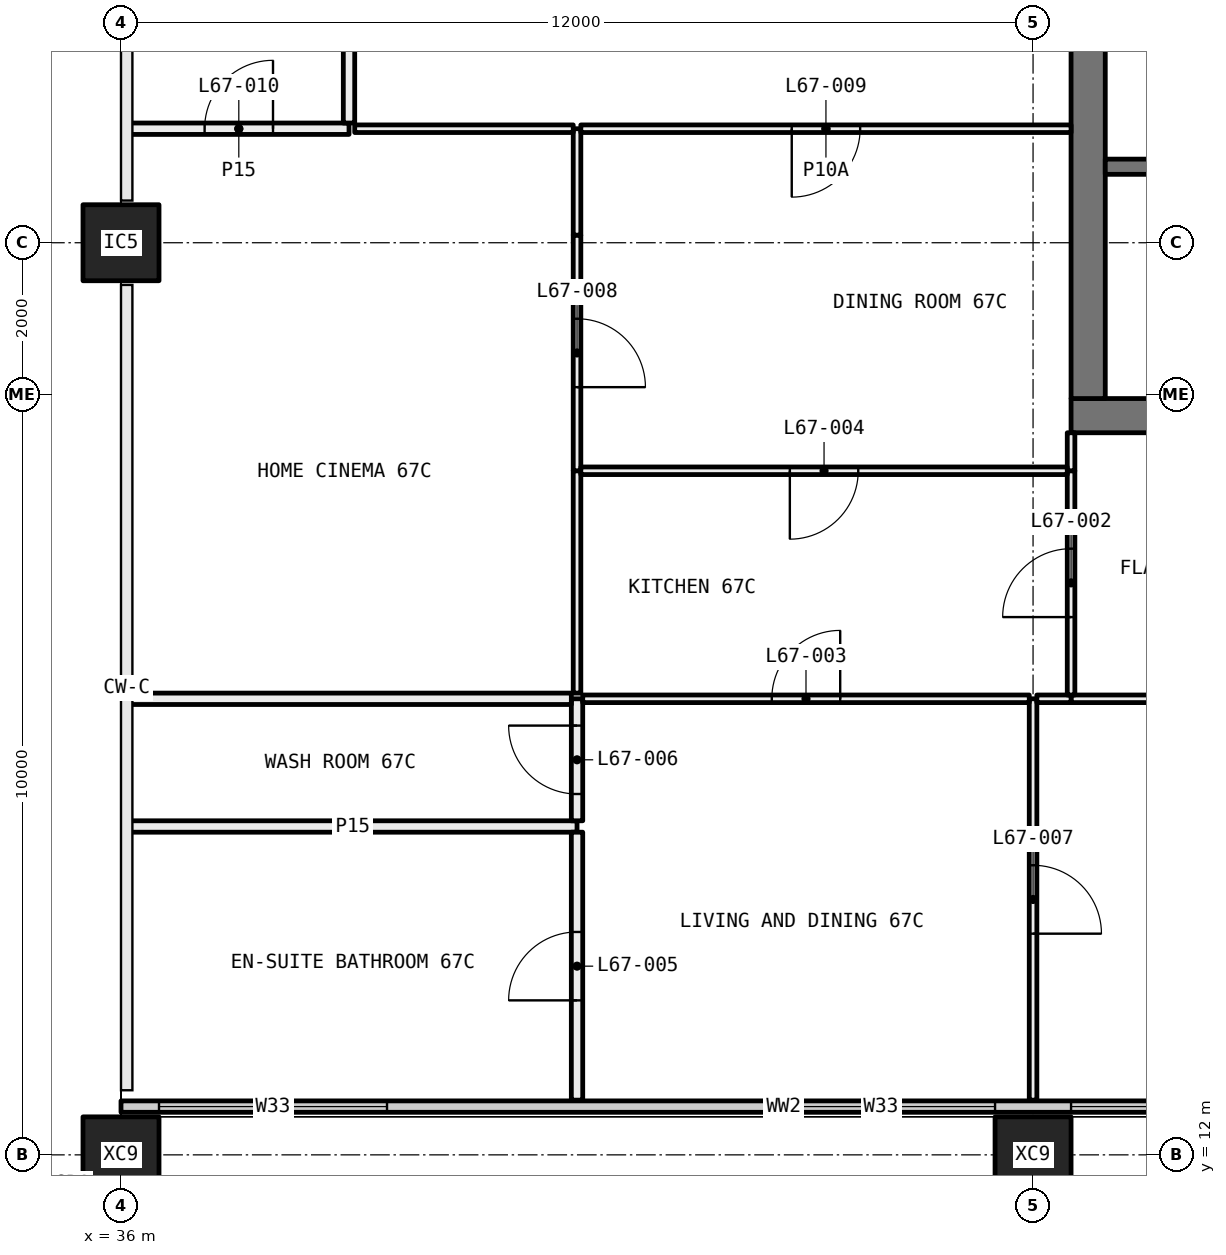
"""IFC4 building model, lengths in metres.
Left out: names, types, materials, properties, quantities, classifications, styles, units other than length and angle.
Written with IfcOpenShell. Run it as: python <this file> out.ifc"""

import sys

from ifc_helpers import new_model, si_unit, direction, frame, frame_2d, origin, origin_2d, place, context, subcontext, project, spatial, rectangle, hollow_rectangle, extrude, element, fill, save


model = new_model("IFC4")
c1 = context("Model", 3, precision=1e-05, world=origin(), true_north=direction((0.0, 1.0)))
c2 = subcontext(c1, "Body", "Model", "MODEL_VIEW")
j1 = project(units=[si_unit("LENGTHUNIT", "METRE"), si_unit("PLANEANGLEUNIT", "RADIAN")], contexts=[c1])
p1 = place(None, origin())
s1 = spatial("IfcSite", under=j1, at=p1, CompositionType="ELEMENT")
p2 = place(p1, origin())
s2 = spatial("IfcBuilding", under=s1, at=p2, CompositionType="ELEMENT")
p3 = place(p2, frame((0.0, 0.0, 249.0)))
s3 = spatial("IfcBuildingStorey", under=s2, at=p3, CompositionType="ELEMENT", Elevation=249.0)
p4 = place(p3, frame((36.0, 12.0, -0.4), z_axis=(0.0, 0.0, 1.0), x_axis=(1.0, 0.0, 0.0)))
e1 = element("IfcColumn", 1, at=p4, inside=s3, PredefinedType="COLUMN", context=c2, shape_type="SweptSolid", body=[
    extrude(hollow_rectangle(XDim=1.0, YDim=1.0, WallThickness=0.036, at=origin_2d()), origin(), (0.0, 0.0, 1.0), 3.45),
])
p5 = place(p3, frame((36.0, 24.0, 0.0), z_axis=(0.0, 0.0, 1.0), x_axis=(1.0, 0.0, 0.0)))
e2 = element("IfcColumn", 2, at=p5, inside=s3, PredefinedType="COLUMN", context=c2, shape_type="SweptSolid", body=[
    extrude(hollow_rectangle(XDim=1.0, YDim=1.0, WallThickness=0.04, at=origin_2d()), origin(), (0.0, 0.0, 1.0), 3.05),
])
p6 = place(p3, frame((48.0, 12.0, -0.4), z_axis=(0.0, 0.0, 1.0), x_axis=(1.0, 0.0, 0.0)))
e3 = element("IfcColumn", 3, at=p6, inside=s3, PredefinedType="COLUMN", context=c2, shape_type="SweptSolid", body=[
    extrude(hollow_rectangle(XDim=1.0, YDim=1.0, WallThickness=0.036, at=origin_2d()), origin(), (0.0, 0.0, 1.0), 3.45),
])
p7 = place(p3, frame((36.0, 12.635, 0.0), z_axis=(0.0, 0.0, 1.0), x_axis=(1.0, 0.0, 0.0)))
e4 = element("IfcWall", 4, at=p7, inside=s3, PredefinedType="ELEMENTEDWALL", context=c2, shape_type="SweptSolid", body=[
    extrude(rectangle(XDim=17.44, YDim=0.15, at=frame_2d((8.72, 0.0))), origin(), (0.0, 0.0, 1.0), 3.05),
])
p8 = place(p7, frame((0.5, 0.0, 0.45)))
e5 = element("IfcOpeningElement", 5, at=p8, cuts=e4, PredefinedType="OPENING", context=c2, shape_type="SweptSolid", body=[
    extrude(rectangle(XDim=3.0, YDim=2.55, at=frame_2d((1.5, 1.275))), frame((0.0, 0.085, 0.0), z_axis=(0.0, -1.0, 0.0), x_axis=(1.0, 0.0, 0.0)), (0.0, 0.0, 1.0), 0.17),
])
p9 = place(p7, frame((8.5, 0.0, 0.45)))
e6 = element("IfcOpeningElement", 6, at=p9, cuts=e4, PredefinedType="OPENING", context=c2, shape_type="SweptSolid", body=[
    extrude(rectangle(XDim=3.0, YDim=2.55, at=frame_2d((1.5, 1.275))), frame((0.0, 0.085, 0.0), z_axis=(0.0, -1.0, 0.0), x_axis=(1.0, 0.0, 0.0)), (0.0, 0.0, 1.0), 0.17),
])
p10 = place(p7, frame((12.5, 0.0, 0.45)))
e7 = element("IfcOpeningElement", 7, at=p10, cuts=e4, PredefinedType="OPENING", context=c2, shape_type="SweptSolid", body=[
    extrude(rectangle(XDim=4.5, YDim=2.55, at=frame_2d((2.25, 1.275))), frame((0.0, 0.085, 0.0), z_axis=(0.0, -1.0, 0.0), x_axis=(1.0, 0.0, 0.0)), (0.0, 0.0, 1.0), 0.17),
])
p11 = place(p3, frame((42.0, 16.32, 0.0), z_axis=(0.0, 0.0, 1.0), x_axis=(-1.0, 0.0, 0.0)))
e8 = element("IfcWall", 8, at=p11, inside=s3, PredefinedType="PARTITIONING", context=c2, shape_type="SweptSolid", body=[
    extrude(rectangle(XDim=5.9, YDim=0.15, at=frame_2d((2.95, 0.0))), origin(), (0.0, 0.0, 1.0), 3.05),
])
p12 = place(p3, frame((42.0, 12.72, 0.0), z_axis=(0.0, 0.0, 1.0), x_axis=(0.0, 1.0, 0.0)))
e9 = element("IfcWall", 9, at=p12, inside=s3, PredefinedType="PARTITIONING", context=c2, shape_type="SweptSolid", body=[
    extrude(rectangle(XDim=3.525, YDim=0.15, at=frame_2d((1.763, 0.0))), origin(), (0.0, 0.0, 1.0), 3.05),
])
p13 = place(p12, frame((1.312, 0.0, 0.0)))
e10 = element("IfcOpeningElement", 10, at=p13, cuts=e9, PredefinedType="OPENING", context=c2, shape_type="SweptSolid", body=[
    extrude(rectangle(XDim=0.9, YDim=2.1, at=frame_2d((0.45, 1.05))), frame((0.0, 0.085, 0.0), z_axis=(0.0, -1.0, 0.0), x_axis=(1.0, 0.0, 0.0)), (0.0, 0.0, 1.0), 0.17),
])
p14 = place(p3, frame((42.0, 16.395, 0.0), z_axis=(0.0, 0.0, 1.0), x_axis=(0.0, 1.0, 0.0)))
e11 = element("IfcWall", 11, at=p14, inside=s3, PredefinedType="PARTITIONING", context=c2, shape_type="SweptSolid", body=[
    extrude(rectangle(XDim=1.605, YDim=0.15, at=frame_2d((0.802, 0.0))), origin(), (0.0, 0.0, 1.0), 3.05),
])
p15 = place(p14, frame((0.353, 0.0, 0.0)))
e12 = element("IfcOpeningElement", 12, at=p15, cuts=e11, PredefinedType="OPENING", context=c2, shape_type="SweptSolid", body=[
    extrude(rectangle(XDim=0.9, YDim=2.1, at=frame_2d((0.45, 1.05))), frame((0.0, 0.085, 0.0), z_axis=(0.0, -1.0, 0.0), x_axis=(1.0, 0.0, 0.0)), (0.0, 0.0, 1.0), 0.17),
])
p16 = place(p3, frame((41.925, 18.0, 0.0), z_axis=(0.0, 0.0, 1.0), x_axis=(-1.0, 0.0, 0.0)))
e13 = element("IfcWall", 13, at=p16, inside=s3, PredefinedType="PARTITIONING", context=c2, shape_type="SweptSolid", body=[
    extrude(rectangle(XDim=5.825, YDim=0.15, at=frame_2d((2.913, 0.0))), origin(), (0.0, 0.0, 1.0), 3.05),
])
p17 = place(p3, frame((48.0, 12.72, 0.0), z_axis=(0.0, 0.0, 1.0), x_axis=(0.0, 1.0, 0.0)))
e14 = element("IfcWall", 14, at=p17, inside=s3, PredefinedType="PARTITIONING", context=c2, shape_type="SweptSolid", body=[
    extrude(rectangle(XDim=5.28, YDim=0.1, at=frame_2d((2.64, 0.0))), origin(), (0.0, 0.0, 1.0), 3.05),
])
p18 = place(p17, frame((2.19, 0.0, 0.0)))
e15 = element("IfcOpeningElement", 15, at=p18, cuts=e14, PredefinedType="OPENING", context=c2, shape_type="SweptSolid", body=[
    extrude(rectangle(XDim=0.9, YDim=2.1, at=frame_2d((0.45, 1.05))), frame((0.0, 0.06, 0.0), z_axis=(0.0, -1.0, 0.0), x_axis=(1.0, 0.0, 0.0)), (0.0, 0.0, 1.0), 0.12),
])
p19 = place(p3, frame((47.95, 18.0, 0.0), z_axis=(0.0, 0.0, 1.0), x_axis=(-1.0, 0.0, 0.0)))
e16 = element("IfcWall", 16, at=p19, inside=s3, PredefinedType="PARTITIONING", context=c2, shape_type="SweptSolid", body=[
    extrude(rectangle(XDim=5.875, YDim=0.1, at=frame_2d((2.938, 0.0))), origin(), (0.0, 0.0, 1.0), 3.05),
])
p20 = place(p19, frame((2.488, 0.0, 0.0)))
e17 = element("IfcOpeningElement", 17, at=p20, cuts=e16, PredefinedType="OPENING", context=c2, shape_type="SweptSolid", body=[
    extrude(rectangle(XDim=0.9, YDim=2.1, at=frame_2d((0.45, 1.05))), frame((0.0, 0.06, 0.0), z_axis=(0.0, -1.0, 0.0), x_axis=(1.0, 0.0, 0.0)), (0.0, 0.0, 1.0), 0.12),
])
p21 = place(p3, frame((53.28, 18.0, 0.0), z_axis=(0.0, 0.0, 1.0), x_axis=(-1.0, 0.0, 0.0)))
e18 = element("IfcWall", 18, at=p21, inside=s3, PredefinedType="PARTITIONING", context=c2, shape_type="SweptSolid", body=[
    extrude(rectangle(XDim=4.78, YDim=0.1, at=frame_2d((2.39, 0.0))), origin(), (0.0, 0.0, 1.0), 3.05),
])
p22 = place(p3, frame((48.5, 18.0, 0.0), z_axis=(0.0, 0.0, 1.0), x_axis=(-1.0, 0.0, 0.0)))
e19 = element("IfcWall", 19, at=p22, inside=s3, PredefinedType="PARTITIONING", context=c2, shape_type="SweptSolid", body=[
    extrude(rectangle(XDim=0.45, YDim=0.1, at=frame_2d((0.225, 0.0))), origin(), (0.0, 0.0, 1.0), 3.05),
])
p23 = place(p3, frame((48.5, 21.0, 0.0), z_axis=(0.0, 0.0, 1.0), x_axis=(0.0, -1.0, 0.0)))
e20 = element("IfcWall", 20, at=p23, inside=s3, PredefinedType="PARTITIONING", context=c2, shape_type="SweptSolid", body=[
    extrude(rectangle(XDim=2.95, YDim=0.1, at=frame_2d((1.475, 0.0))), origin(), (0.0, 0.0, 1.0), 3.05),
])
p24 = place(p23, frame((1.025, 0.0, 0.0)))
e21 = element("IfcOpeningElement", 21, at=p24, cuts=e20, PredefinedType="OPENING", context=c2, shape_type="SweptSolid", body=[
    extrude(rectangle(XDim=0.9, YDim=2.1, at=frame_2d((0.45, 1.05))), frame((0.0, 0.06, 0.0), z_axis=(0.0, -1.0, 0.0), x_axis=(1.0, 0.0, 0.0)), (0.0, 0.0, 1.0), 0.12),
])
p25 = place(p3, frame((48.5, 21.5, 0.0), z_axis=(0.0, 0.0, 1.0), x_axis=(0.0, -1.0, 0.0)))
e22 = element("IfcWall", 22, at=p25, inside=s3, PredefinedType="PARTITIONING", context=c2, shape_type="SweptSolid", body=[
    extrude(rectangle(XDim=0.5, YDim=0.1, at=frame_2d((0.25, 0.0))), origin(), (0.0, 0.0, 1.0), 3.05),
])
p26 = place(p3, frame((42.0, 18.075, 0.0), z_axis=(0.0, 0.0, 1.0), x_axis=(0.0, 1.0, 0.0)))
e23 = element("IfcWall", 23, at=p26, inside=s3, PredefinedType="PARTITIONING", context=c2, shape_type="SweptSolid", body=[
    extrude(rectangle(XDim=2.925, YDim=0.1, at=frame_2d((1.462, 0.0))), origin(), (0.0, 0.0, 1.0), 3.05),
])
p27 = place(p3, frame((42.0, 21.0, 0.0), z_axis=(0.0, 0.0, 1.0), x_axis=(0.0, 1.0, 0.0)))
e24 = element("IfcWall", 24, at=p27, inside=s3, PredefinedType="PARTITIONING", context=c2, shape_type="SweptSolid", body=[
    extrude(rectangle(XDim=3.1, YDim=0.1, at=frame_2d((1.55, 0.0))), origin(), (0.0, 0.0, 1.0), 2.45),
])
p28 = place(p27, frame((1.1, 0.0, 0.0)))
e25 = element("IfcOpeningElement", 25, at=p28, cuts=e24, PredefinedType="OPENING", context=c2, shape_type="SweptSolid", body=[
    extrude(rectangle(XDim=0.9, YDim=2.1, at=frame_2d((0.45, 1.05))), frame((0.0, 0.06, 0.0), z_axis=(0.0, -1.0, 0.0), x_axis=(1.0, 0.0, 0.0)), (0.0, 0.0, 1.0), 0.12),
])
p29 = place(p3, frame((42.0, 24.1, 0.0), z_axis=(0.0, 0.0, 1.0), x_axis=(0.0, 1.0, 0.0)))
e26 = element("IfcWall", 26, at=p29, inside=s3, PredefinedType="PARTITIONING", context=c2, shape_type="SweptSolid", body=[
    extrude(rectangle(XDim=1.4, YDim=0.1, at=frame_2d((0.7, 0.0))), origin(), (0.0, 0.0, 1.0), 3.05),
])
p30 = place(p3, frame((39.0, 25.5, 0.0), z_axis=(0.0, 0.0, 1.0), x_axis=(-1.0, 0.0, 0.0)))
e27 = element("IfcWall", 27, at=p30, inside=s3, PredefinedType="PARTITIONING", context=c2, shape_type="SweptSolid", body=[
    extrude(rectangle(XDim=2.9, YDim=0.15, at=frame_2d((1.45, 0.0))), origin(), (0.0, 0.0, 1.0), 3.05),
])
p31 = place(p30, frame((1.0, 0.0, 0.0)))
e28 = element("IfcOpeningElement", 28, at=p31, cuts=e27, PredefinedType="OPENING", context=c2, shape_type="SweptSolid", body=[
    extrude(rectangle(XDim=0.9, YDim=2.1, at=frame_2d((0.45, 1.05))), frame((0.0, 0.085, 0.0), z_axis=(0.0, -1.0, 0.0), x_axis=(1.0, 0.0, 0.0)), (0.0, 0.0, 1.0), 0.17),
])
p32 = place(p3, frame((41.95, 25.5, 0.0), z_axis=(0.0, 0.0, 1.0), x_axis=(-1.0, 0.0, 0.0)))
e29 = element("IfcWall", 29, at=p32, inside=s3, PredefinedType="PARTITIONING", context=c2, shape_type="SweptSolid", body=[
    extrude(rectangle(XDim=2.875, YDim=0.1, at=frame_2d((1.438, 0.0))), origin(), (0.0, 0.0, 1.0), 3.05),
])
p33 = place(p3, frame((48.45, 21.0, 0.0), z_axis=(0.0, 0.0, 1.0), x_axis=(-1.0, 0.0, 0.0)))
e30 = element("IfcWall", 30, at=p33, inside=s3, PredefinedType="PARTITIONING", context=c2, shape_type="SweptSolid", body=[
    extrude(rectangle(XDim=6.4, YDim=0.1, at=frame_2d((3.2, 0.0))), origin(), (0.0, 0.0, 1.0), 3.05),
])
p34 = place(p33, frame((2.75, 0.0, 0.0)))
e31 = element("IfcOpeningElement", 31, at=p34, cuts=e30, PredefinedType="OPENING", context=c2, shape_type="SweptSolid", body=[
    extrude(rectangle(XDim=0.9, YDim=2.1, at=frame_2d((0.45, 1.05))), frame((0.0, 0.06, 0.0), z_axis=(0.0, -1.0, 0.0), x_axis=(1.0, 0.0, 0.0)), (0.0, 0.0, 1.0), 0.12),
])
p35 = place(p3, frame((48.5, 25.5, 0.0), z_axis=(0.0, 0.0, 1.0), x_axis=(-1.0, 0.0, 0.0)))
e32 = element("IfcWall", 32, at=p35, inside=s3, PredefinedType="PARTITIONING", context=c2, shape_type="SweptSolid", body=[
    extrude(rectangle(XDim=6.45, YDim=0.1, at=frame_2d((3.225, 0.0))), origin(), (0.0, 0.0, 1.0), 3.05),
])
p36 = place(p35, frame((2.775, 0.0, 0.0)))
e33 = element("IfcOpeningElement", 33, at=p36, cuts=e32, PredefinedType="OPENING", context=c2, shape_type="SweptSolid", body=[
    extrude(rectangle(XDim=0.9, YDim=2.1, at=frame_2d((0.45, 1.05))), frame((0.0, 0.06, 0.0), z_axis=(0.0, -1.0, 0.0), x_axis=(1.0, 0.0, 0.0)), (0.0, 0.0, 1.0), 0.12),
])
p37 = place(p3, frame((39.0, 25.575, 0.0), z_axis=(0.0, 0.0, 1.0), x_axis=(0.0, 1.0, 0.0)))
e34 = element("IfcWall", 34, at=p37, inside=s3, PredefinedType="PARTITIONING", context=c2, shape_type="SweptSolid", body=[
    extrude(rectangle(XDim=1.712, YDim=0.15, at=frame_2d((0.856, 0.0))), origin(), (0.0, 0.0, 1.0), 3.05),
])
p38 = place(p3, frame((59.5, 21.725, 0.0), z_axis=(0.0, 0.0, 1.0), x_axis=(-1.0, 0.0, 0.0)))
e35 = element("IfcWall", 35, at=p38, inside=s3, PredefinedType="SHEAR", context=c2, shape_type="SweptSolid", body=[
    extrude(rectangle(XDim=11.0, YDim=0.45, at=frame_2d((5.5, 0.0))), origin(), (0.0, 0.0, 1.0), 3.05),
])
p39 = place(p38, frame((1.125, 0.0, 0.0)))
e36 = element("IfcOpeningElement", 36, at=p39, cuts=e35, PredefinedType="OPENING", context=c2, shape_type="SweptSolid", body=[
    extrude(rectangle(XDim=1.0, YDim=2.1, at=frame_2d((0.5, 1.05))), frame((0.0, 0.235, 0.0), z_axis=(0.0, -1.0, 0.0), x_axis=(1.0, 0.0, 0.0)), (0.0, 0.0, 1.0), 0.47),
])
p40 = place(p3, frame((48.725, 21.95, 0.0), z_axis=(0.0, 0.0, 1.0), x_axis=(0.0, 1.0, 0.0)))
e37 = element("IfcWall", 37, at=p40, inside=s3, PredefinedType="SHEAR", context=c2, shape_type="SweptSolid", body=[
    extrude(rectangle(XDim=16.1, YDim=0.45, at=frame_2d((8.05, 0.0))), origin(), (0.0, 0.0, 1.0), 3.05),
])
p41 = place(p40, frame((7.25, 0.0, 0.0)))
e38 = element("IfcOpeningElement", 38, at=p41, cuts=e37, PredefinedType="OPENING", context=c2, shape_type="SweptSolid", body=[
    extrude(rectangle(XDim=1.6, YDim=2.1, at=frame_2d((0.8, 1.05))), frame((0.0, 0.235, 0.0), z_axis=(0.0, -1.0, 0.0), x_axis=(1.0, 0.0, 0.0)), (0.0, 0.0, 1.0), 0.47),
])
p42 = place(p3, frame((56.5, 25.0, 0.0), z_axis=(0.0, 0.0, 1.0), x_axis=(-1.0, 0.0, 0.0)))
e39 = element("IfcWall", 39, at=p42, inside=s3, PredefinedType="SOLIDWALL", context=c2, shape_type="SweptSolid", body=[
    extrude(rectangle(XDim=7.55, YDim=0.2, at=frame_2d((3.775, 0.0))), origin(), (0.0, 0.0, 1.0), 3.05),
])
p43 = place(p8, origin())
e40 = element("IfcWindow", 40, at=p43, inside=s3, PartitioningType="SINGLE_PANEL", PredefinedType="WINDOW", context=c2, shape_type="SweptSolid", body=[
    extrude(rectangle(XDim=3.0, YDim=2.55, at=frame_2d((1.5, 1.275))), frame((0.0, 0.03, 0.0), z_axis=(0.0, -1.0, 0.0), x_axis=(1.0, 0.0, 0.0)), (0.0, 0.0, 1.0), 0.06),
])
fill(e5, e40)
p44 = place(p9, origin())
e41 = element("IfcWindow", 41, at=p44, inside=s3, PartitioningType="SINGLE_PANEL", PredefinedType="WINDOW", context=c2, shape_type="SweptSolid", body=[
    extrude(rectangle(XDim=3.0, YDim=2.55, at=frame_2d((1.5, 1.275))), frame((0.0, 0.03, 0.0), z_axis=(0.0, -1.0, 0.0), x_axis=(1.0, 0.0, 0.0)), (0.0, 0.0, 1.0), 0.06),
])
fill(e6, e41)
p45 = place(p10, origin())
e42 = element("IfcWindow", 42, at=p45, inside=s3, PartitioningType="SINGLE_PANEL", PredefinedType="WINDOW", context=c2, shape_type="SweptSolid", body=[
    extrude(rectangle(XDim=4.5, YDim=2.55, at=frame_2d((2.25, 1.275))), frame((0.0, 0.03, 0.0), z_axis=(0.0, -1.0, 0.0), x_axis=(1.0, 0.0, 0.0)), (0.0, 0.0, 1.0), 0.06),
])
fill(e7, e42)
p46 = place(p24, frame((0.9, 0.0, 0.0), x_axis=(-1.0, 0.0, 0.0)))
e43 = element("IfcDoor", 43, at=p46, inside=s3, OperationType="SINGLE_SWING_RIGHT", PredefinedType="DOOR", context=c2, shape_type="SweptSolid", body=[
    extrude(rectangle(XDim=0.9, YDim=2.1, at=frame_2d((0.45, 1.05))), frame((0.0, 0.025, 0.0), z_axis=(0.0, -1.0, 0.0), x_axis=(1.0, 0.0, 0.0)), (0.0, 0.0, 1.0), 0.05),
])
fill(e21, e43)
p47 = place(p20, frame((0.9, 0.0, 0.0), x_axis=(-1.0, 0.0, 0.0)))
e44 = element("IfcDoor", 44, at=p47, inside=s3, OperationType="SINGLE_SWING_LEFT", PredefinedType="DOOR", context=c2, shape_type="SweptSolid", body=[
    extrude(rectangle(XDim=0.9, YDim=2.1, at=frame_2d((0.45, 1.05))), frame((0.0, 0.025, 0.0), z_axis=(0.0, -1.0, 0.0), x_axis=(1.0, 0.0, 0.0)), (0.0, 0.0, 1.0), 0.05),
])
fill(e17, e44)
p48 = place(p34, origin())
e45 = element("IfcDoor", 45, at=p48, inside=s3, OperationType="SINGLE_SWING_LEFT", PredefinedType="DOOR", context=c2, shape_type="SweptSolid", body=[
    extrude(rectangle(XDim=0.9, YDim=2.1, at=frame_2d((0.45, 1.05))), frame((0.0, 0.025, 0.0), z_axis=(0.0, -1.0, 0.0), x_axis=(1.0, 0.0, 0.0)), (0.0, 0.0, 1.0), 0.05),
])
fill(e31, e45)
p49 = place(p13, origin())
e46 = element("IfcDoor", 46, at=p49, inside=s3, OperationType="SINGLE_SWING_RIGHT", PredefinedType="DOOR", context=c2, shape_type="SweptSolid", body=[
    extrude(rectangle(XDim=0.9, YDim=2.1, at=frame_2d((0.45, 1.05))), frame((0.0, 0.025, 0.0), z_axis=(0.0, -1.0, 0.0), x_axis=(1.0, 0.0, 0.0)), (0.0, 0.0, 1.0), 0.05),
])
fill(e10, e46)
p50 = place(p15, origin())
e47 = element("IfcDoor", 47, at=p50, inside=s3, OperationType="SINGLE_SWING_LEFT", PredefinedType="DOOR", context=c2, shape_type="SweptSolid", body=[
    extrude(rectangle(XDim=0.9, YDim=2.1, at=frame_2d((0.45, 1.05))), frame((0.0, 0.025, 0.0), z_axis=(0.0, -1.0, 0.0), x_axis=(1.0, 0.0, 0.0)), (0.0, 0.0, 1.0), 0.05),
])
fill(e12, e47)
p51 = place(p18, frame((0.9, 0.0, 0.0), x_axis=(-1.0, 0.0, 0.0)))
e48 = element("IfcDoor", 48, at=p51, inside=s3, OperationType="SINGLE_SWING_LEFT", PredefinedType="DOOR", context=c2, shape_type="SweptSolid", body=[
    extrude(rectangle(XDim=0.9, YDim=2.1, at=frame_2d((0.45, 1.05))), frame((0.0, 0.025, 0.0), z_axis=(0.0, -1.0, 0.0), x_axis=(1.0, 0.0, 0.0)), (0.0, 0.0, 1.0), 0.05),
])
fill(e15, e48)
p52 = place(p28, frame((0.9, 0.0, 0.0), x_axis=(-1.0, 0.0, 0.0)))
e49 = element("IfcDoor", 49, at=p52, inside=s3, OperationType="SINGLE_SWING_LEFT", PredefinedType="DOOR", context=c2, shape_type="SweptSolid", body=[
    extrude(rectangle(XDim=0.9, YDim=2.1, at=frame_2d((0.45, 1.05))), frame((0.0, 0.025, 0.0), z_axis=(0.0, -1.0, 0.0), x_axis=(1.0, 0.0, 0.0)), (0.0, 0.0, 1.0), 0.05),
])
fill(e25, e49)
p53 = place(p36, origin())
e50 = element("IfcDoor", 50, at=p53, inside=s3, OperationType="SINGLE_SWING_LEFT", PredefinedType="DOOR", context=c2, shape_type="SweptSolid", body=[
    extrude(rectangle(XDim=0.9, YDim=2.1, at=frame_2d((0.45, 1.05))), frame((0.0, 0.025, 0.0), z_axis=(0.0, -1.0, 0.0), x_axis=(1.0, 0.0, 0.0)), (0.0, 0.0, 1.0), 0.05),
])
fill(e33, e50)
p54 = place(p31, frame((0.9, 0.0, 0.0), x_axis=(-1.0, 0.0, 0.0)))
e51 = element("IfcDoor", 51, at=p54, inside=s3, OperationType="SINGLE_SWING_LEFT", PredefinedType="DOOR", context=c2, shape_type="SweptSolid", body=[
    extrude(rectangle(XDim=0.9, YDim=2.1, at=frame_2d((0.45, 1.05))), frame((0.0, 0.025, 0.0), z_axis=(0.0, -1.0, 0.0), x_axis=(1.0, 0.0, 0.0)), (0.0, 0.0, 1.0), 0.05),
])
fill(e28, e51)
save(model, sys.argv[1])
